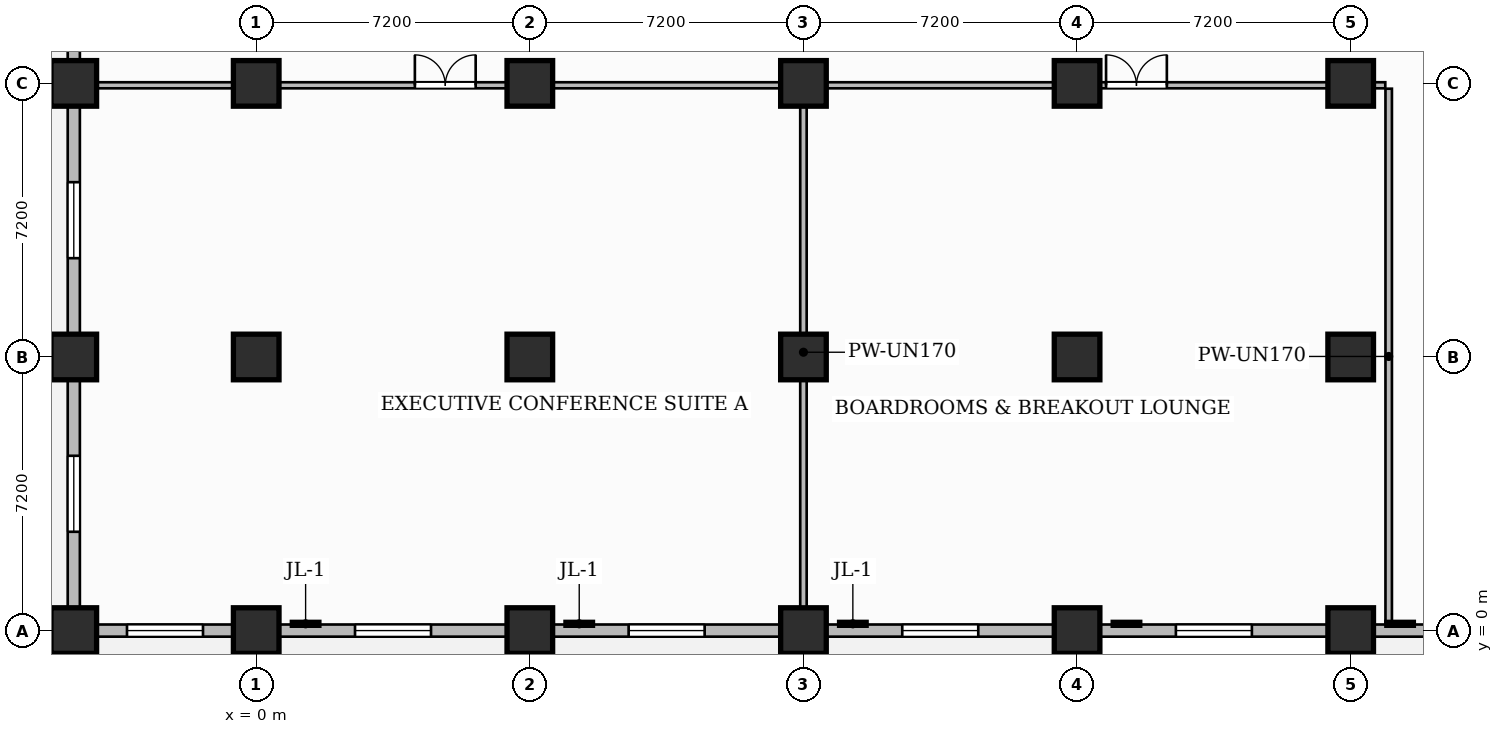
"""IFC4 building model, lengths in metres.
Left out: names, types, materials, properties, quantities, classifications, styles, units other than length and angle.
Written with IfcOpenShell. Run it as: python <this file> out.ifc"""

import sys

from ifc_helpers import new_model, si_unit, direction, frame, frame_2d, origin, origin_2d, place, context, subcontext, project, spatial, rectangle, extrude, source, transform, mapped, element, fill, save


model = new_model("IFC4")
c1 = context("Model", 3, precision=1e-05, world=origin(), true_north=direction((0.0, 1.0)))
c2 = subcontext(c1, "Body", "Model", "MODEL_VIEW")
j1 = project(units=[si_unit("LENGTHUNIT", "METRE"), si_unit("PLANEANGLEUNIT", "RADIAN")], contexts=[c1])
p1 = place(None, origin())
s1 = spatial("IfcSite", under=j1, at=p1, CompositionType="ELEMENT")
p2 = place(p1, origin())
s2 = spatial("IfcBuilding", under=s1, at=p2, CompositionType="ELEMENT")
p3 = place(p2, frame((0.0, 0.0, 16.2)))
s3 = spatial("IfcBuildingStorey", under=s2, at=p3, CompositionType="ELEMENT", Elevation=16.2)
m1 = source(origin(), c2, "Body", "SweptSolid", [
    extrude(rectangle(XDim=1.2, YDim=1.2, at=origin_2d()), origin(), (0.0, 0.0, 1.0), 5.4),
])
for number, where, z_axis, x_axis in (
    (1, (-4.8, 0.0, 0.0), (0.0, 0.0, 1.0), (1.0, 0.0, 0.0)),
    (2, (-4.8, 7.2, 0.0), (0.0, 0.0, 1.0), (1.0, 0.0, 0.0)),
    (3, (-4.8, 14.4, 0.0), (0.0, 0.0, 1.0), (1.0, 0.0, 0.0)),
    (4, (0.0, 0.0, 0.0), (0.0, 0.0, 1.0), (1.0, 0.0, 0.0)),
    (5, (0.0, 7.2, 0.0), (0.0, 0.0, 1.0), (1.0, 0.0, 0.0)),
    (6, (0.0, 14.4, 0.0), (0.0, 0.0, 1.0), (1.0, 0.0, 0.0)),
    (7, (7.2, 0.0, 0.0), (0.0, 0.0, 1.0), (1.0, 0.0, 0.0)),
    (8, (7.2, 7.2, 0.0), (0.0, 0.0, 1.0), (1.0, 0.0, 0.0)),
    (9, (7.2, 14.4, 0.0), (0.0, 0.0, 1.0), (1.0, 0.0, 0.0)),
    (10, (14.4, 0.0, 0.0), (0.0, 0.0, 1.0), (1.0, 0.0, 0.0)),
    (11, (14.4, 7.2, 0.0), (0.0, 0.0, 1.0), (1.0, 0.0, 0.0)),
    (12, (14.4, 14.4, 0.0), (0.0, 0.0, 1.0), (1.0, 0.0, 0.0)),
    (13, (21.6, 0.0, 0.0), (0.0, 0.0, 1.0), (1.0, 0.0, 0.0)),
    (14, (21.6, 7.2, 0.0), (0.0, 0.0, 1.0), (1.0, 0.0, 0.0)),
    (15, (21.6, 14.4, 0.0), (0.0, 0.0, 1.0), (1.0, 0.0, 0.0)),
    (16, (28.8, 0.0, 0.0), (0.0, 0.0, 1.0), (1.0, 0.0, 0.0)),
    (17, (28.8, 7.2, 0.0), (0.0, 0.0, 1.0), (1.0, 0.0, 0.0)),
    (18, (28.8, 14.4, 0.0), (0.0, 0.0, 1.0), (1.0, 0.0, 0.0)),
):
    element("IfcColumn", number, at=place(p3, frame(where, z_axis=z_axis, x_axis=x_axis)), inside=s3, PredefinedType="COLUMN", context=c2, shape_type="MappedRepresentation", body=[
        mapped(m1, transform((0.0, 0.0, 0.0), scale=1.0)),
    ])
p4 = place(p3, frame((-4.36, 14.35, 0.0), z_axis=(0.0, 0.0, 1.0), x_axis=(1.0, 0.0, 0.0)))
e19 = element("IfcWall", 19, at=p4, inside=s3, PredefinedType="PARTITIONING", context=c2, shape_type="SweptSolid", body=[
    extrude(rectangle(XDim=34.07, YDim=0.16, at=frame_2d((17.035, 0.0))), origin(), (0.0, 0.0, 1.0), 4.185),
])
p5 = place(p4, frame((8.535, 0.0, 0.0)))
e20 = element("IfcOpeningElement", 20, at=p5, cuts=e19, PredefinedType="OPENING", context=c2, shape_type="SweptSolid", body=[
    extrude(rectangle(XDim=1.6, YDim=2.4, at=frame_2d((0.8, 1.2))), frame((0.0, 0.09, 0.0), z_axis=(0.0, -1.0, 0.0), x_axis=(1.0, 0.0, 0.0)), (0.0, 0.0, 1.0), 0.18),
])
p6 = place(p4, frame((26.722, 0.0, 0.0)))
e21 = element("IfcOpeningElement", 21, at=p6, cuts=e19, PredefinedType="OPENING", context=c2, shape_type="SweptSolid", body=[
    extrude(rectangle(XDim=1.6, YDim=2.4, at=frame_2d((0.8, 1.2))), frame((0.0, 0.09, 0.0), z_axis=(0.0, -1.0, 0.0), x_axis=(1.0, 0.0, 0.0)), (0.0, 0.0, 1.0), 0.18),
])
p7 = place(p3, frame((14.4, 0.39, 0.0), z_axis=(0.0, 0.0, 1.0), x_axis=(0.0, 1.0, 0.0)))
e22 = element("IfcWall", 22, at=p7, inside=s3, PredefinedType="PARTITIONING", context=c2, shape_type="SweptSolid", body=[
    extrude(rectangle(XDim=13.87, YDim=0.17, at=frame_2d((6.935, 0.0))), origin(), (0.0, 0.0, 1.0), 4.185),
])
p8 = place(p3, frame((29.8, 0.168, 0.0), z_axis=(0.0, 0.0, 1.0), x_axis=(0.0, 1.0, 0.0)))
e23 = element("IfcWall", 23, at=p8, inside=s3, PredefinedType="PARTITIONING", context=c2, shape_type="SweptSolid", body=[
    extrude(rectangle(XDim=14.092, YDim=0.17, at=frame_2d((7.046, 0.0))), origin(), (0.0, 0.0, 1.0), 5.1),
])
p9 = place(p3, frame((-4.8, 0.0, 0.0), z_axis=(0.0, 0.0, 1.0), x_axis=(1.0, 0.0, 0.0)))
e24 = element("IfcWall", 24, at=p9, inside=s3, PredefinedType="SOLIDWALL", context=c2, shape_type="SweptSolid", body=[
    extrude(rectangle(XDim=85.2, YDim=0.32, at=frame_2d((42.6, 0.0))), origin(), (0.0, 0.0, 1.0), 4.185),
])
p10 = place(p9, frame((1.4, 0.0, 0.75)))
e25 = element("IfcOpeningElement", 25, at=p10, cuts=e24, PredefinedType="OPENING", context=c2, shape_type="SweptSolid", body=[
    extrude(rectangle(XDim=2.0, YDim=2.6, at=frame_2d((1.0, 1.3))), frame((0.0, 0.17, 0.0), z_axis=(0.0, -1.0, 0.0), x_axis=(1.0, 0.0, 0.0)), (0.0, 0.0, 1.0), 0.34),
])
p11 = place(p9, frame((7.4, 0.0, 0.75)))
e26 = element("IfcOpeningElement", 26, at=p11, cuts=e24, PredefinedType="OPENING", context=c2, shape_type="SweptSolid", body=[
    extrude(rectangle(XDim=2.0, YDim=2.6, at=frame_2d((1.0, 1.3))), frame((0.0, 0.17, 0.0), z_axis=(0.0, -1.0, 0.0), x_axis=(1.0, 0.0, 0.0)), (0.0, 0.0, 1.0), 0.34),
])
p12 = place(p9, frame((14.6, 0.0, 0.75)))
e27 = element("IfcOpeningElement", 27, at=p12, cuts=e24, PredefinedType="OPENING", context=c2, shape_type="SweptSolid", body=[
    extrude(rectangle(XDim=2.0, YDim=2.6, at=frame_2d((1.0, 1.3))), frame((0.0, 0.17, 0.0), z_axis=(0.0, -1.0, 0.0), x_axis=(1.0, 0.0, 0.0)), (0.0, 0.0, 1.0), 0.34),
])
p13 = place(p9, frame((21.8, 0.0, 0.75)))
e28 = element("IfcOpeningElement", 28, at=p13, cuts=e24, PredefinedType="OPENING", context=c2, shape_type="SweptSolid", body=[
    extrude(rectangle(XDim=2.0, YDim=2.6, at=frame_2d((1.0, 1.3))), frame((0.0, 0.17, 0.0), z_axis=(0.0, -1.0, 0.0), x_axis=(1.0, 0.0, 0.0)), (0.0, 0.0, 1.0), 0.34),
])
p14 = place(p9, frame((29.0, 0.0, 0.75)))
e29 = element("IfcOpeningElement", 29, at=p14, cuts=e24, PredefinedType="OPENING", context=c2, shape_type="SweptSolid", body=[
    extrude(rectangle(XDim=2.0, YDim=2.6, at=frame_2d((1.0, 1.3))), frame((0.0, 0.17, 0.0), z_axis=(0.0, -1.0, 0.0), x_axis=(1.0, 0.0, 0.0)), (0.0, 0.0, 1.0), 0.34),
])
p15 = place(p9, frame((35.6, 0.0, 0.75)))
e30 = element("IfcOpeningElement", 30, at=p15, cuts=e24, PredefinedType="OPENING", context=c2, shape_type="SweptSolid", body=[
    extrude(rectangle(XDim=2.0, YDim=2.6, at=frame_2d((1.0, 1.3))), frame((0.0, 0.17, 0.0), z_axis=(0.0, -1.0, 0.0), x_axis=(1.0, 0.0, 0.0)), (0.0, 0.0, 1.0), 0.34),
])
p16 = place(p9, frame((42.2, 0.0, 0.75)))
e31 = element("IfcOpeningElement", 31, at=p16, cuts=e24, PredefinedType="OPENING", context=c2, shape_type="SweptSolid", body=[
    extrude(rectangle(XDim=2.0, YDim=2.6, at=frame_2d((1.0, 1.3))), frame((0.0, 0.17, 0.0), z_axis=(0.0, -1.0, 0.0), x_axis=(1.0, 0.0, 0.0)), (0.0, 0.0, 1.0), 0.34),
])
p17 = place(p9, frame((49.7, 0.0, 0.75)))
e32 = element("IfcOpeningElement", 32, at=p17, cuts=e24, PredefinedType="OPENING", context=c2, shape_type="SweptSolid", body=[
    extrude(rectangle(XDim=2.0, YDim=2.6, at=frame_2d((1.0, 1.3))), frame((0.0, 0.17, 0.0), z_axis=(0.0, -1.0, 0.0), x_axis=(1.0, 0.0, 0.0)), (0.0, 0.0, 1.0), 0.34),
])
p18 = place(p9, frame((57.5, 0.0, 0.75)))
e33 = element("IfcOpeningElement", 33, at=p18, cuts=e24, PredefinedType="OPENING", context=c2, shape_type="SweptSolid", body=[
    extrude(rectangle(XDim=2.0, YDim=2.6, at=frame_2d((1.0, 1.3))), frame((0.0, 0.17, 0.0), z_axis=(0.0, -1.0, 0.0), x_axis=(1.0, 0.0, 0.0)), (0.0, 0.0, 1.0), 0.34),
])
p19 = place(p9, frame((66.8, 0.0, 0.75)))
e34 = element("IfcOpeningElement", 34, at=p19, cuts=e24, PredefinedType="OPENING", context=c2, shape_type="SweptSolid", body=[
    extrude(rectangle(XDim=2.0, YDim=2.6, at=frame_2d((1.0, 1.3))), frame((0.0, 0.17, 0.0), z_axis=(0.0, -1.0, 0.0), x_axis=(1.0, 0.0, 0.0)), (0.0, 0.0, 1.0), 0.34),
])
p20 = place(p9, frame((77.6, 0.0, 0.75)))
e35 = element("IfcOpeningElement", 35, at=p20, cuts=e24, PredefinedType="OPENING", context=c2, shape_type="SweptSolid", body=[
    extrude(rectangle(XDim=2.0, YDim=2.6, at=frame_2d((1.0, 1.3))), frame((0.0, 0.17, 0.0), z_axis=(0.0, -1.0, 0.0), x_axis=(1.0, 0.0, 0.0)), (0.0, 0.0, 1.0), 0.34),
])
p21 = place(p3, frame((-4.8, 0.05, 0.0), z_axis=(0.0, 0.0, 1.0), x_axis=(0.0, 1.0, 0.0)))
e36 = element("IfcWall", 36, at=p21, inside=s3, PredefinedType="SOLIDWALL", context=c2, shape_type="SweptSolid", body=[
    extrude(rectangle(XDim=46.7, YDim=0.32, at=frame_2d((23.35, 0.0))), origin(), (0.0, 0.0, 1.0), 4.185),
])
p22 = place(p21, frame((2.55, 0.0, 0.75)))
e37 = element("IfcOpeningElement", 37, at=p22, cuts=e36, PredefinedType="OPENING", context=c2, shape_type="SweptSolid", body=[
    extrude(rectangle(XDim=2.0, YDim=2.6, at=frame_2d((1.0, 1.3))), frame((0.0, 0.17, 0.0), z_axis=(0.0, -1.0, 0.0), x_axis=(1.0, 0.0, 0.0)), (0.0, 0.0, 1.0), 0.34),
])
p23 = place(p21, frame((9.75, 0.0, 0.75)))
e38 = element("IfcOpeningElement", 38, at=p23, cuts=e36, PredefinedType="OPENING", context=c2, shape_type="SweptSolid", body=[
    extrude(rectangle(XDim=2.0, YDim=2.6, at=frame_2d((1.0, 1.3))), frame((0.0, 0.17, 0.0), z_axis=(0.0, -1.0, 0.0), x_axis=(1.0, 0.0, 0.0)), (0.0, 0.0, 1.0), 0.34),
])
p24 = place(p21, frame((16.95, 0.0, 0.75)))
e39 = element("IfcOpeningElement", 39, at=p24, cuts=e36, PredefinedType="OPENING", context=c2, shape_type="SweptSolid", body=[
    extrude(rectangle(XDim=2.0, YDim=2.6, at=frame_2d((1.0, 1.3))), frame((0.0, 0.17, 0.0), z_axis=(0.0, -1.0, 0.0), x_axis=(1.0, 0.0, 0.0)), (0.0, 0.0, 1.0), 0.34),
])
p25 = place(p21, frame((27.75, 0.0, 0.75)))
e40 = element("IfcOpeningElement", 40, at=p25, cuts=e36, PredefinedType="OPENING", context=c2, shape_type="SweptSolid", body=[
    extrude(rectangle(XDim=2.0, YDim=2.6, at=frame_2d((1.0, 1.3))), frame((0.0, 0.17, 0.0), z_axis=(0.0, -1.0, 0.0), x_axis=(1.0, 0.0, 0.0)), (0.0, 0.0, 1.0), 0.34),
])
p26 = place(p21, frame((34.95, 0.0, 0.75)))
e41 = element("IfcOpeningElement", 41, at=p26, cuts=e36, PredefinedType="OPENING", context=c2, shape_type="SweptSolid", body=[
    extrude(rectangle(XDim=2.0, YDim=2.6, at=frame_2d((1.0, 1.3))), frame((0.0, 0.17, 0.0), z_axis=(0.0, -1.0, 0.0), x_axis=(1.0, 0.0, 0.0)), (0.0, 0.0, 1.0), 0.34),
])
p27 = place(p21, frame((42.15, 0.0, 0.75)))
e42 = element("IfcOpeningElement", 42, at=p27, cuts=e36, PredefinedType="OPENING", context=c2, shape_type="SweptSolid", body=[
    extrude(rectangle(XDim=2.0, YDim=2.6, at=frame_2d((1.0, 1.3))), frame((0.0, 0.17, 0.0), z_axis=(0.0, -1.0, 0.0), x_axis=(1.0, 0.0, 0.0)), (0.0, 0.0, 1.0), 0.34),
])
for number, where, z_axis, x_axis in (
    (43, (21.6, -0.23, 0.0), (0.0, 0.0, 1.0), (0.0, -1.0, 0.0)),
    (44, (28.8, -2.8, 0.0), (0.0, 0.0, 1.0), (0.0, 1.0, 0.0)),
):
    element("IfcWall", number, at=place(p3, frame(where, z_axis=z_axis, x_axis=x_axis)), inside=s3, PredefinedType="PARAPET", context=c2, shape_type="SweptSolid", body=[
        extrude(rectangle(XDim=2.57, YDim=0.25, at=frame_2d((1.285, 0.0))), origin(), (0.0, 0.0, 1.0), 0.95),
    ])
m2 = source(origin(), c2, "Body", "SweptSolid", [
    extrude(rectangle(XDim=1.6, YDim=2.4, at=frame_2d((0.8, 1.2))), frame((0.0, 0.025, 0.0), z_axis=(0.0, -1.0, 0.0), x_axis=(1.0, 0.0, 0.0)), (0.0, 0.0, 1.0), 0.05),
])
p28 = place(p5, origin())
e45 = element("IfcDoor", 45, at=p28, inside=s3, OperationType="DOUBLE_DOOR_SINGLE_SWING", PredefinedType="DOOR", context=c2, shape_type="MappedRepresentation", body=[
    mapped(m2, transform((0.0, 0.0, 0.0), scale=1.0)),
])
fill(e20, e45)
p29 = place(p6, origin())
e46 = element("IfcDoor", 46, at=p29, inside=s3, OperationType="DOUBLE_DOOR_SINGLE_SWING", PredefinedType="DOOR", context=c2, shape_type="MappedRepresentation", body=[
    mapped(m2, transform((0.0, 0.0, 0.0), scale=1.0)),
])
fill(e21, e46)
m3 = source(origin(), c2, "Body", "SweptSolid", [
    extrude(rectangle(XDim=2.0, YDim=2.6, at=frame_2d((1.0, 1.3))), frame((0.0, 0.03, 0.0), z_axis=(0.0, -1.0, 0.0), x_axis=(1.0, 0.0, 0.0)), (0.0, 0.0, 1.0), 0.06),
])
p30 = place(p10, origin())
e47 = element("IfcWindow", 47, at=p30, inside=s3, PartitioningType="DOUBLE_PANEL_VERTICAL", PredefinedType="WINDOW", context=c2, shape_type="MappedRepresentation", body=[
    mapped(m3, transform((0.0, 0.0, 0.0), scale=1.0)),
])
fill(e25, e47)
p31 = place(p11, origin())
e48 = element("IfcWindow", 48, at=p31, inside=s3, PartitioningType="DOUBLE_PANEL_VERTICAL", PredefinedType="WINDOW", context=c2, shape_type="MappedRepresentation", body=[
    mapped(m3, transform((0.0, 0.0, 0.0), scale=1.0)),
])
fill(e26, e48)
p32 = place(p12, origin())
e49 = element("IfcWindow", 49, at=p32, inside=s3, PartitioningType="DOUBLE_PANEL_VERTICAL", PredefinedType="WINDOW", context=c2, shape_type="MappedRepresentation", body=[
    mapped(m3, transform((0.0, 0.0, 0.0), scale=1.0)),
])
fill(e27, e49)
p33 = place(p13, origin())
e50 = element("IfcWindow", 50, at=p33, inside=s3, PartitioningType="DOUBLE_PANEL_VERTICAL", PredefinedType="WINDOW", context=c2, shape_type="MappedRepresentation", body=[
    mapped(m3, transform((0.0, 0.0, 0.0), scale=1.0)),
])
fill(e28, e50)
p34 = place(p14, origin())
e51 = element("IfcWindow", 51, at=p34, inside=s3, PartitioningType="DOUBLE_PANEL_VERTICAL", PredefinedType="WINDOW", context=c2, shape_type="MappedRepresentation", body=[
    mapped(m3, transform((0.0, 0.0, 0.0), scale=1.0)),
])
fill(e29, e51)
p35 = place(p22, origin())
e52 = element("IfcWindow", 52, at=p35, inside=s3, PartitioningType="DOUBLE_PANEL_VERTICAL", PredefinedType="WINDOW", context=c2, shape_type="MappedRepresentation", body=[
    mapped(m3, transform((0.0, 0.0, 0.0), scale=1.0)),
])
fill(e37, e52)
p36 = place(p23, origin())
e53 = element("IfcWindow", 53, at=p36, inside=s3, PartitioningType="DOUBLE_PANEL_VERTICAL", PredefinedType="WINDOW", context=c2, shape_type="MappedRepresentation", body=[
    mapped(m3, transform((0.0, 0.0, 0.0), scale=1.0)),
])
fill(e38, e53)
save(model, sys.argv[1])
